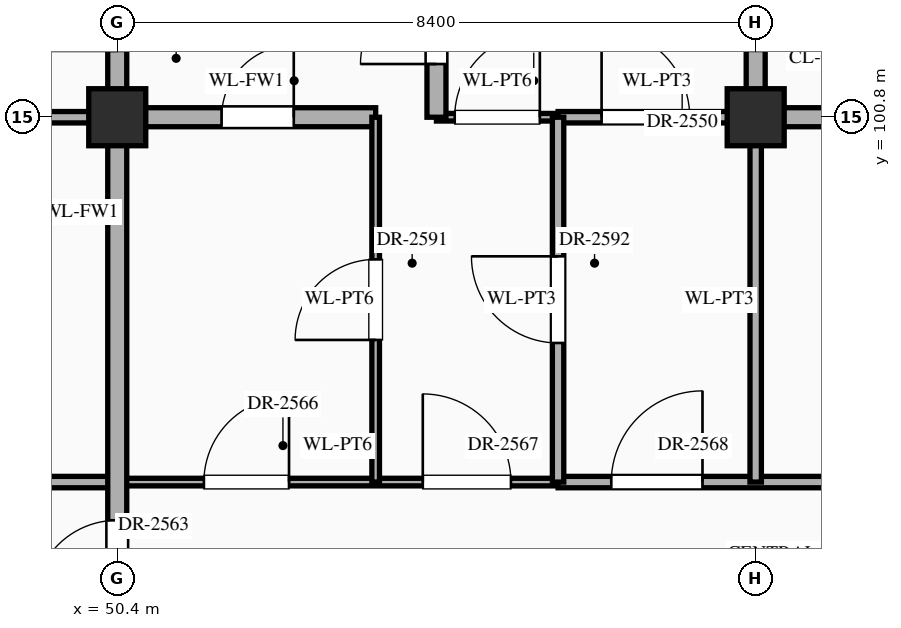
"""IFC4 building model, lengths in metres.
Left out: names, types, materials, properties, quantities, classifications, styles, units other than length and angle.
Written with IfcOpenShell. Run it as: python <this file> out.ifc"""

import sys

from ifc_helpers import new_model, si_unit, direction, frame, frame_2d, origin, origin_2d, place, context, subcontext, project, spatial, rectangle, extrude, element, fill, save


model = new_model("IFC4")
c1 = context("Model", 3, precision=1e-05, world=origin(), true_north=direction((0.0, 1.0)))
c2 = subcontext(c1, "Body", "Model", "MODEL_VIEW")
j1 = project(units=[si_unit("LENGTHUNIT", "METRE"), si_unit("PLANEANGLEUNIT", "RADIAN")], contexts=[c1])
p1 = place(None, origin())
s1 = spatial("IfcSite", under=j1, at=p1, CompositionType="ELEMENT")
p2 = place(p1, origin())
s2 = spatial("IfcBuilding", under=s1, at=p2, CompositionType="ELEMENT")
p3 = place(p2, frame((0.0, 0.0, 35.1)))
s3 = spatial("IfcBuildingStorey", under=s2, at=p3, CompositionType="ELEMENT", Elevation=35.1)
for number, where, z_axis, x_axis in (
    (1, (50.4, 100.8, 0.0), (0.0, 0.0, 1.0), (1.0, 0.0, 0.0)),
    (2, (58.8, 100.8, 0.0), (0.0, 0.0, 1.0), (1.0, 0.0, 0.0)),
):
    element("IfcColumn", number, at=place(p3, frame(where, z_axis=z_axis, x_axis=x_axis)), inside=s3, PredefinedType="COLUMN", context=c2, shape_type="SweptSolid", body=[
        extrude(rectangle(XDim=0.75, YDim=0.75, at=origin_2d()), origin(), (0.0, 0.0, 1.0), 4.2),
    ])
p4 = place(p3, frame((42.04, 96.0, 0.0), z_axis=(0.0, 0.0, 1.0), x_axis=(1.0, 0.0, 0.0)))
e3 = element("IfcWall", 3, at=p4, inside=s3, PredefinedType="STANDARD", context=c2, shape_type="SweptSolid", body=[
    extrude(rectangle(XDim=8.36, YDim=0.15, at=frame_2d((4.18, 0.0))), origin(), (0.0, 0.0, 1.0), 3.95),
])
p5 = place(p4, frame((3.66, 0.0, 0.0)))
e4 = element("IfcOpeningElement", 4, at=p5, cuts=e3, PredefinedType="OPENING", context=c2, shape_type="SweptSolid", body=[
    extrude(rectangle(XDim=1.04, YDim=2.2, at=frame_2d((0.52, 1.1))), frame((0.0, 0.087, 0.0), z_axis=(0.0, -1.0, 0.0), x_axis=(1.0, 0.0, 0.0)), (0.0, 0.0, 1.0), 0.174),
])
p6 = place(p3, frame((50.4, 96.0, 0.0), z_axis=(0.0, 0.0, 1.0), x_axis=(1.0, 0.0, 0.0)))
e5 = element("IfcWall", 5, at=p6, inside=s3, PredefinedType="STANDARD", context=c2, shape_type="SweptSolid", body=[
    extrude(rectangle(XDim=5.8, YDim=0.1, at=frame_2d((2.9, 0.0))), origin(), (0.0, 0.0, 1.0), 3.95),
])
p7 = place(p6, frame((1.14, 0.0, 0.0)))
e6 = element("IfcOpeningElement", 6, at=p7, cuts=e5, PredefinedType="OPENING", context=c2, shape_type="SweptSolid", body=[
    extrude(rectangle(XDim=1.12, YDim=2.25, at=frame_2d((0.56, 1.125))), frame((0.0, 0.062, 0.0), z_axis=(0.0, -1.0, 0.0), x_axis=(1.0, 0.0, 0.0)), (0.0, 0.0, 1.0), 0.124),
])
p8 = place(p6, frame((4.02, 0.0, 0.0)))
e7 = element("IfcOpeningElement", 7, at=p8, cuts=e5, PredefinedType="OPENING", context=c2, shape_type="SweptSolid", body=[
    extrude(rectangle(XDim=1.16, YDim=2.3, at=frame_2d((0.58, 1.15))), frame((0.0, 0.062, 0.0), z_axis=(0.0, -1.0, 0.0), x_axis=(1.0, 0.0, 0.0)), (0.0, 0.0, 1.0), 0.124),
])
p9 = place(p3, frame((56.2, 96.0, 0.0), z_axis=(0.0, 0.0, 1.0), x_axis=(1.0, 0.0, 0.0)))
e8 = element("IfcWall", 8, at=p9, inside=s3, PredefinedType="STANDARD", context=c2, shape_type="SweptSolid", body=[
    extrude(rectangle(XDim=27.8, YDim=0.15, at=frame_2d((13.9, 0.0))), origin(), (0.0, 0.0, 1.0), 3.95),
])
p10 = place(p9, frame((0.7, 0.0, 0.0)))
e9 = element("IfcOpeningElement", 9, at=p10, cuts=e8, PredefinedType="OPENING", context=c2, shape_type="SweptSolid", body=[
    extrude(rectangle(XDim=1.2, YDim=2.35, at=frame_2d((0.6, 1.175))), frame((0.0, 0.087, 0.0), z_axis=(0.0, -1.0, 0.0), x_axis=(1.0, 0.0, 0.0)), (0.0, 0.0, 1.0), 0.174),
])
p11 = place(p9, frame((6.18, 0.0, 0.0)))
e10 = element("IfcOpeningElement", 10, at=p11, cuts=e8, PredefinedType="OPENING", context=c2, shape_type="SweptSolid", body=[
    extrude(rectangle(XDim=1.24, YDim=2.3, at=frame_2d((0.62, 1.15))), frame((0.0, 0.087, 0.0), z_axis=(0.0, -1.0, 0.0), x_axis=(1.0, 0.0, 0.0)), (0.0, 0.0, 1.0), 0.174),
])
p12 = place(p9, frame((14.56, 0.0, 0.0)))
e11 = element("IfcOpeningElement", 11, at=p12, cuts=e8, PredefinedType="OPENING", context=c2, shape_type="SweptSolid", body=[
    extrude(rectangle(XDim=1.28, YDim=2.35, at=frame_2d((0.64, 1.175))), frame((0.0, 0.087, 0.0), z_axis=(0.0, -1.0, 0.0), x_axis=(1.0, 0.0, 0.0)), (0.0, 0.0, 1.0), 0.174),
])
p13 = place(p9, frame((23.13, 0.0, 0.0)))
e12 = element("IfcOpeningElement", 12, at=p13, cuts=e8, PredefinedType="OPENING", context=c2, shape_type="SweptSolid", body=[
    extrude(rectangle(XDim=0.94, YDim=2.3, at=frame_2d((0.47, 1.15))), frame((0.0, 0.087, 0.0), z_axis=(0.0, -1.0, 0.0), x_axis=(1.0, 0.0, 0.0)), (0.0, 0.0, 1.0), 0.174),
])
p14 = place(p3, frame((46.2, 100.8, 0.0), z_axis=(0.0, 0.0, 1.0), x_axis=(1.0, 0.0, 0.0)))
e13 = element("IfcWall", 13, at=p14, inside=s3, PredefinedType="STANDARD", context=c2, shape_type="SweptSolid", body=[
    extrude(rectangle(XDim=4.2, YDim=0.15, at=frame_2d((2.1, 0.0))), origin(), (0.0, 0.0, 1.0), 3.1),
])
p15 = place(p14, frame((1.433, 0.0, 0.0)))
e14 = element("IfcOpeningElement", 14, at=p15, cuts=e13, PredefinedType="OPENING", context=c2, shape_type="SweptSolid", body=[
    extrude(rectangle(XDim=1.04, YDim=2.2, at=frame_2d((0.52, 1.1))), frame((0.0, 0.087, 0.0), z_axis=(0.0, -1.0, 0.0), x_axis=(1.0, 0.0, 0.0)), (0.0, 0.0, 1.0), 0.174),
])
p16 = place(p3, frame((50.4, 100.8, 0.0), z_axis=(0.0, 0.0, 1.0), x_axis=(1.0, 0.0, 0.0)))
e15 = element("IfcWall", 15, at=p16, inside=s3, PredefinedType="STANDARD", context=c2, shape_type="SweptSolid", body=[
    extrude(rectangle(XDim=3.4, YDim=0.25, at=frame_2d((1.7, 0.0))), origin(), (0.0, 0.0, 1.0), 3.1),
])
p17 = place(p16, frame((1.373, 0.0, 0.0)))
e16 = element("IfcOpeningElement", 16, at=p17, cuts=e15, PredefinedType="OPENING", context=c2, shape_type="SweptSolid", body=[
    extrude(rectangle(XDim=0.95, YDim=2.15, at=frame_2d((0.475, 1.075))), frame((0.0, 0.137, 0.0), z_axis=(0.0, -1.0, 0.0), x_axis=(1.0, 0.0, 0.0)), (0.0, 0.0, 1.0), 0.274),
])
p18 = place(p3, frame((54.6, 100.8, 0.0), z_axis=(0.0, 0.0, 1.0), x_axis=(1.0, 0.0, 0.0)))
e17 = element("IfcWall", 17, at=p18, inside=s3, PredefinedType="STANDARD", context=c2, shape_type="SweptSolid", body=[
    extrude(rectangle(XDim=1.6, YDim=0.1, at=frame_2d((0.8, 0.0))), origin(), (0.0, 0.0, 1.0), 3.1),
])
p19 = place(p18, frame((0.24, 0.0, 0.0)))
e18 = element("IfcOpeningElement", 18, at=p19, cuts=e17, PredefinedType="OPENING", context=c2, shape_type="SweptSolid", body=[
    extrude(rectangle(XDim=1.12, YDim=2.25, at=frame_2d((0.56, 1.125))), frame((0.0, 0.062, 0.0), z_axis=(0.0, -1.0, 0.0), x_axis=(1.0, 0.0, 0.0)), (0.0, 0.0, 1.0), 0.124),
])
p20 = place(p3, frame((56.2, 100.8, 0.0), z_axis=(0.0, 0.0, 1.0), x_axis=(1.0, 0.0, 0.0)))
e19 = element("IfcWall", 19, at=p20, inside=s3, PredefinedType="STANDARD", context=c2, shape_type="SweptSolid", body=[
    extrude(rectangle(XDim=2.6, YDim=0.15, at=frame_2d((1.3, 0.0))), origin(), (0.0, 0.0, 1.0), 3.1),
])
p21 = place(p20, frame((0.573, 0.0, 0.0)))
e20 = element("IfcOpeningElement", 20, at=p21, cuts=e19, PredefinedType="OPENING", context=c2, shape_type="SweptSolid", body=[
    extrude(rectangle(XDim=1.16, YDim=2.3, at=frame_2d((0.58, 1.15))), frame((0.0, 0.087, 0.0), z_axis=(0.0, -1.0, 0.0), x_axis=(1.0, 0.0, 0.0)), (0.0, 0.0, 1.0), 0.174),
])
p22 = place(p3, frame((58.8, 100.8, 0.0), z_axis=(0.0, 0.0, 1.0), x_axis=(1.0, 0.0, 0.0)))
e21 = element("IfcWall", 21, at=p22, inside=s3, PredefinedType="STANDARD", context=c2, shape_type="SweptSolid", body=[
    extrude(rectangle(XDim=12.6, YDim=0.25, at=frame_2d((6.3, 0.0))), origin(), (0.0, 0.0, 1.0), 3.1),
])
p23 = place(p22, frame((3.65, 0.0, 0.0)))
e22 = element("IfcOpeningElement", 22, at=p23, cuts=e21, PredefinedType="OPENING", context=c2, shape_type="SweptSolid", body=[
    extrude(rectangle(XDim=1.1, YDim=2.2, at=frame_2d((0.55, 1.1))), frame((0.0, 0.137, 0.0), z_axis=(0.0, -1.0, 0.0), x_axis=(1.0, 0.0, 0.0)), (0.0, 0.0, 1.0), 0.274),
])
p24 = place(p3, frame((50.4, 91.2, 0.0), z_axis=(0.0, 0.0, 1.0), x_axis=(0.0, 1.0, 0.0)))
e23 = element("IfcWall", 23, at=p24, inside=s3, PredefinedType="STANDARD", context=c2, shape_type="SweptSolid", body=[
    extrude(rectangle(XDim=13.2, YDim=0.25, at=frame_2d((6.6, 0.0))), origin(), (0.0, 0.0, 1.0), 3.2),
])
p25 = place(p24, frame((0.577, 0.0, 0.0)))
e24 = element("IfcOpeningElement", 24, at=p25, cuts=e23, PredefinedType="OPENING", context=c2, shape_type="SweptSolid", body=[
    extrude(rectangle(XDim=0.95, YDim=2.15, at=frame_2d((0.475, 1.075))), frame((0.0, 0.137, 0.0), z_axis=(0.0, -1.0, 0.0), x_axis=(1.0, 0.0, 0.0)), (0.0, 0.0, 1.0), 0.274),
])
p26 = place(p24, frame((10.472, 0.0, 0.0)))
e25 = element("IfcOpeningElement", 25, at=p26, cuts=e23, PredefinedType="OPENING", context=c2, shape_type="SweptSolid", body=[
    extrude(rectangle(XDim=0.95, YDim=2.15, at=frame_2d((0.475, 1.075))), frame((0.0, 0.137, 0.0), z_axis=(0.0, -1.0, 0.0), x_axis=(1.0, 0.0, 0.0)), (0.0, 0.0, 1.0), 0.274),
])
p27 = place(p24, frame((3.198, 0.0, 0.0)))
e26 = element("IfcOpeningElement", 26, at=p27, cuts=e23, PredefinedType="OPENING", context=c2, shape_type="SweptSolid", body=[
    extrude(rectangle(XDim=1.1, YDim=2.2, at=frame_2d((0.55, 1.1))), frame((0.0, 0.137, 0.0), z_axis=(0.0, -1.0, 0.0), x_axis=(1.0, 0.0, 0.0)), (0.0, 0.0, 1.0), 0.274),
])
p28 = place(p3, frame((53.8, 96.0, 0.0), z_axis=(0.0, 0.0, 1.0), x_axis=(0.0, 1.0, 0.0)))
e27 = element("IfcWall", 27, at=p28, inside=s3, PredefinedType="STANDARD", context=c2, shape_type="SweptSolid", body=[
    extrude(rectangle(XDim=4.8, YDim=0.1, at=frame_2d((2.4, 0.0))), origin(), (0.0, 0.0, 1.0), 3.95),
])
p29 = place(p28, frame((1.87, 0.0, 0.0)))
e28 = element("IfcOpeningElement", 28, at=p29, cuts=e27, PredefinedType="OPENING", context=c2, shape_type="SweptSolid", body=[
    extrude(rectangle(XDim=1.06, YDim=2.4, at=frame_2d((0.53, 1.2))), frame((0.0, 0.062, 0.0), z_axis=(0.0, -1.0, 0.0), x_axis=(1.0, 0.0, 0.0)), (0.0, 0.0, 1.0), 0.124),
])
p30 = place(p3, frame((54.6, 100.8, 0.0), z_axis=(0.0, 0.0, 1.0), x_axis=(0.0, 1.0, 0.0)))
e29 = element("IfcWall", 29, at=p30, inside=s3, PredefinedType="STANDARD", context=c2, shape_type="SweptSolid", body=[
    extrude(rectangle(XDim=3.6, YDim=0.25, at=frame_2d((1.8, 0.0))), origin(), (0.0, 0.0, 1.0), 3.65),
])
p31 = place(p30, frame((0.7, 0.0, 0.0)))
e30 = element("IfcOpeningElement", 30, at=p31, cuts=e29, PredefinedType="OPENING", context=c2, shape_type="SweptSolid", body=[
    extrude(rectangle(XDim=1.0, YDim=2.2, at=frame_2d((0.5, 1.1))), frame((0.0, 0.137, 0.0), z_axis=(0.0, -1.0, 0.0), x_axis=(1.0, 0.0, 0.0)), (0.0, 0.0, 1.0), 0.274),
])
p32 = place(p3, frame((56.2, 96.0, 0.0), z_axis=(0.0, 0.0, 1.0), x_axis=(0.0, 1.0, 0.0)))
e31 = element("IfcWall", 31, at=p32, inside=s3, PredefinedType="STANDARD", context=c2, shape_type="SweptSolid", body=[
    extrude(rectangle(XDim=4.8, YDim=0.15, at=frame_2d((2.4, 0.0))), origin(), (0.0, 0.0, 1.0), 3.95),
])
p33 = place(p32, frame((1.83, 0.0, 0.0)))
e32 = element("IfcOpeningElement", 32, at=p33, cuts=e31, PredefinedType="OPENING", context=c2, shape_type="SweptSolid", body=[
    extrude(rectangle(XDim=1.14, YDim=2.4, at=frame_2d((0.57, 1.2))), frame((0.0, 0.087, 0.0), z_axis=(0.0, -1.0, 0.0), x_axis=(1.0, 0.0, 0.0)), (0.0, 0.0, 1.0), 0.174),
])
p34 = place(p3, frame((58.8, 96.0, 0.0), z_axis=(0.0, 0.0, 1.0), x_axis=(0.0, 1.0, 0.0)))
e33 = element("IfcWall", 33, at=p34, inside=s3, PredefinedType="STANDARD", context=c2, shape_type="SweptSolid", body=[
    extrude(rectangle(XDim=4.8, YDim=0.15, at=frame_2d((2.4, 0.0))), origin(), (0.0, 0.0, 1.0), 3.2),
])
p35 = place(p3, frame((58.8, 100.8, 0.0), z_axis=(0.0, 0.0, 1.0), x_axis=(0.0, 1.0, 0.0)))
e34 = element("IfcWall", 34, at=p35, inside=s3, PredefinedType="STANDARD", context=c2, shape_type="SweptSolid", body=[
    extrude(rectangle(XDim=2.4, YDim=0.25, at=frame_2d((1.2, 0.0))), origin(), (0.0, 0.0, 1.0), 3.2),
])
p36 = place(p35, frame((0.873, 0.0, 0.0)))
e35 = element("IfcOpeningElement", 35, at=p36, cuts=e34, PredefinedType="OPENING", context=c2, shape_type="SweptSolid", body=[
    extrude(rectangle(XDim=0.95, YDim=2.15, at=frame_2d((0.475, 1.075))), frame((0.0, 0.137, 0.0), z_axis=(0.0, -1.0, 0.0), x_axis=(1.0, 0.0, 0.0)), (0.0, 0.0, 1.0), 0.274),
])
p37 = place(p31, origin())
e36 = element("IfcDoor", 36, at=p37, inside=s3, OperationType="SINGLE_SWING_LEFT", PredefinedType="DOOR", context=c2, shape_type="SweptSolid", body=[
    extrude(rectangle(XDim=1.0, YDim=2.2, at=frame_2d((0.5, 1.1))), frame((0.0, 0.025, 0.0), z_axis=(0.0, -1.0, 0.0), x_axis=(1.0, 0.0, 0.0)), (0.0, 0.0, 1.0), 0.05),
])
fill(e30, e36)
p38 = place(p17, origin())
e37 = element("IfcDoor", 37, at=p38, inside=s3, OperationType="SINGLE_SWING_RIGHT", PredefinedType="DOOR", context=c2, shape_type="SweptSolid", body=[
    extrude(rectangle(XDim=0.95, YDim=2.15, at=frame_2d((0.475, 1.075))), frame((0.0, 0.025, 0.0), z_axis=(0.0, -1.0, 0.0), x_axis=(1.0, 0.0, 0.0)), (0.0, 0.0, 1.0), 0.05),
])
fill(e16, e37)
p39 = place(p19, origin())
e38 = element("IfcDoor", 38, at=p39, inside=s3, OperationType="SINGLE_SWING_RIGHT", PredefinedType="DOOR", context=c2, shape_type="SweptSolid", body=[
    extrude(rectangle(XDim=1.12, YDim=2.25, at=frame_2d((0.56, 1.125))), frame((0.0, 0.025, 0.0), z_axis=(0.0, -1.0, 0.0), x_axis=(1.0, 0.0, 0.0)), (0.0, 0.0, 1.0), 0.05),
])
fill(e18, e38)
p40 = place(p21, origin())
e39 = element("IfcDoor", 39, at=p40, inside=s3, OperationType="SINGLE_SWING_LEFT", PredefinedType="DOOR", context=c2, shape_type="SweptSolid", body=[
    extrude(rectangle(XDim=1.16, YDim=2.3, at=frame_2d((0.58, 1.15))), frame((0.0, 0.025, 0.0), z_axis=(0.0, -1.0, 0.0), x_axis=(1.0, 0.0, 0.0)), (0.0, 0.0, 1.0), 0.05),
])
fill(e20, e39)
p41 = place(p27, origin())
e40 = element("IfcDoor", 40, at=p41, inside=s3, OperationType="SINGLE_SWING_LEFT", PredefinedType="DOOR", context=c2, shape_type="SweptSolid", body=[
    extrude(rectangle(XDim=1.1, YDim=2.2, at=frame_2d((0.55, 1.1))), frame((0.0, 0.025, 0.0), z_axis=(0.0, -1.0, 0.0), x_axis=(1.0, 0.0, 0.0)), (0.0, 0.0, 1.0), 0.05),
])
fill(e26, e40)
p42 = place(p7, origin())
e41 = element("IfcDoor", 41, at=p42, inside=s3, OperationType="SINGLE_SWING_RIGHT", PredefinedType="DOOR", context=c2, shape_type="SweptSolid", body=[
    extrude(rectangle(XDim=1.12, YDim=2.25, at=frame_2d((0.56, 1.125))), frame((0.0, 0.025, 0.0), z_axis=(0.0, -1.0, 0.0), x_axis=(1.0, 0.0, 0.0)), (0.0, 0.0, 1.0), 0.05),
])
fill(e6, e41)
p43 = place(p8, origin())
e42 = element("IfcDoor", 42, at=p43, inside=s3, OperationType="SINGLE_SWING_LEFT", PredefinedType="DOOR", context=c2, shape_type="SweptSolid", body=[
    extrude(rectangle(XDim=1.16, YDim=2.3, at=frame_2d((0.58, 1.15))), frame((0.0, 0.025, 0.0), z_axis=(0.0, -1.0, 0.0), x_axis=(1.0, 0.0, 0.0)), (0.0, 0.0, 1.0), 0.05),
])
fill(e7, e42)
p44 = place(p10, origin())
e43 = element("IfcDoor", 43, at=p44, inside=s3, OperationType="SINGLE_SWING_RIGHT", PredefinedType="DOOR", context=c2, shape_type="SweptSolid", body=[
    extrude(rectangle(XDim=1.2, YDim=2.35, at=frame_2d((0.6, 1.175))), frame((0.0, 0.025, 0.0), z_axis=(0.0, -1.0, 0.0), x_axis=(1.0, 0.0, 0.0)), (0.0, 0.0, 1.0), 0.05),
])
fill(e9, e43)
p45 = place(p29, origin())
e44 = element("IfcDoor", 44, at=p45, inside=s3, OperationType="SINGLE_SWING_LEFT", PredefinedType="DOOR", context=c2, shape_type="SweptSolid", body=[
    extrude(rectangle(XDim=1.06, YDim=2.4, at=frame_2d((0.53, 1.2))), frame((0.0, 0.025, 0.0), z_axis=(0.0, -1.0, 0.0), x_axis=(1.0, 0.0, 0.0)), (0.0, 0.0, 1.0), 0.05),
])
fill(e28, e44)
p46 = place(p33, origin())
e45 = element("IfcDoor", 45, at=p46, inside=s3, OperationType="SINGLE_SWING_RIGHT", PredefinedType="DOOR", context=c2, shape_type="SweptSolid", body=[
    extrude(rectangle(XDim=1.14, YDim=2.4, at=frame_2d((0.57, 1.2))), frame((0.0, 0.025, 0.0), z_axis=(0.0, -1.0, 0.0), x_axis=(1.0, 0.0, 0.0)), (0.0, 0.0, 1.0), 0.05),
])
fill(e32, e45)
save(model, sys.argv[1])
